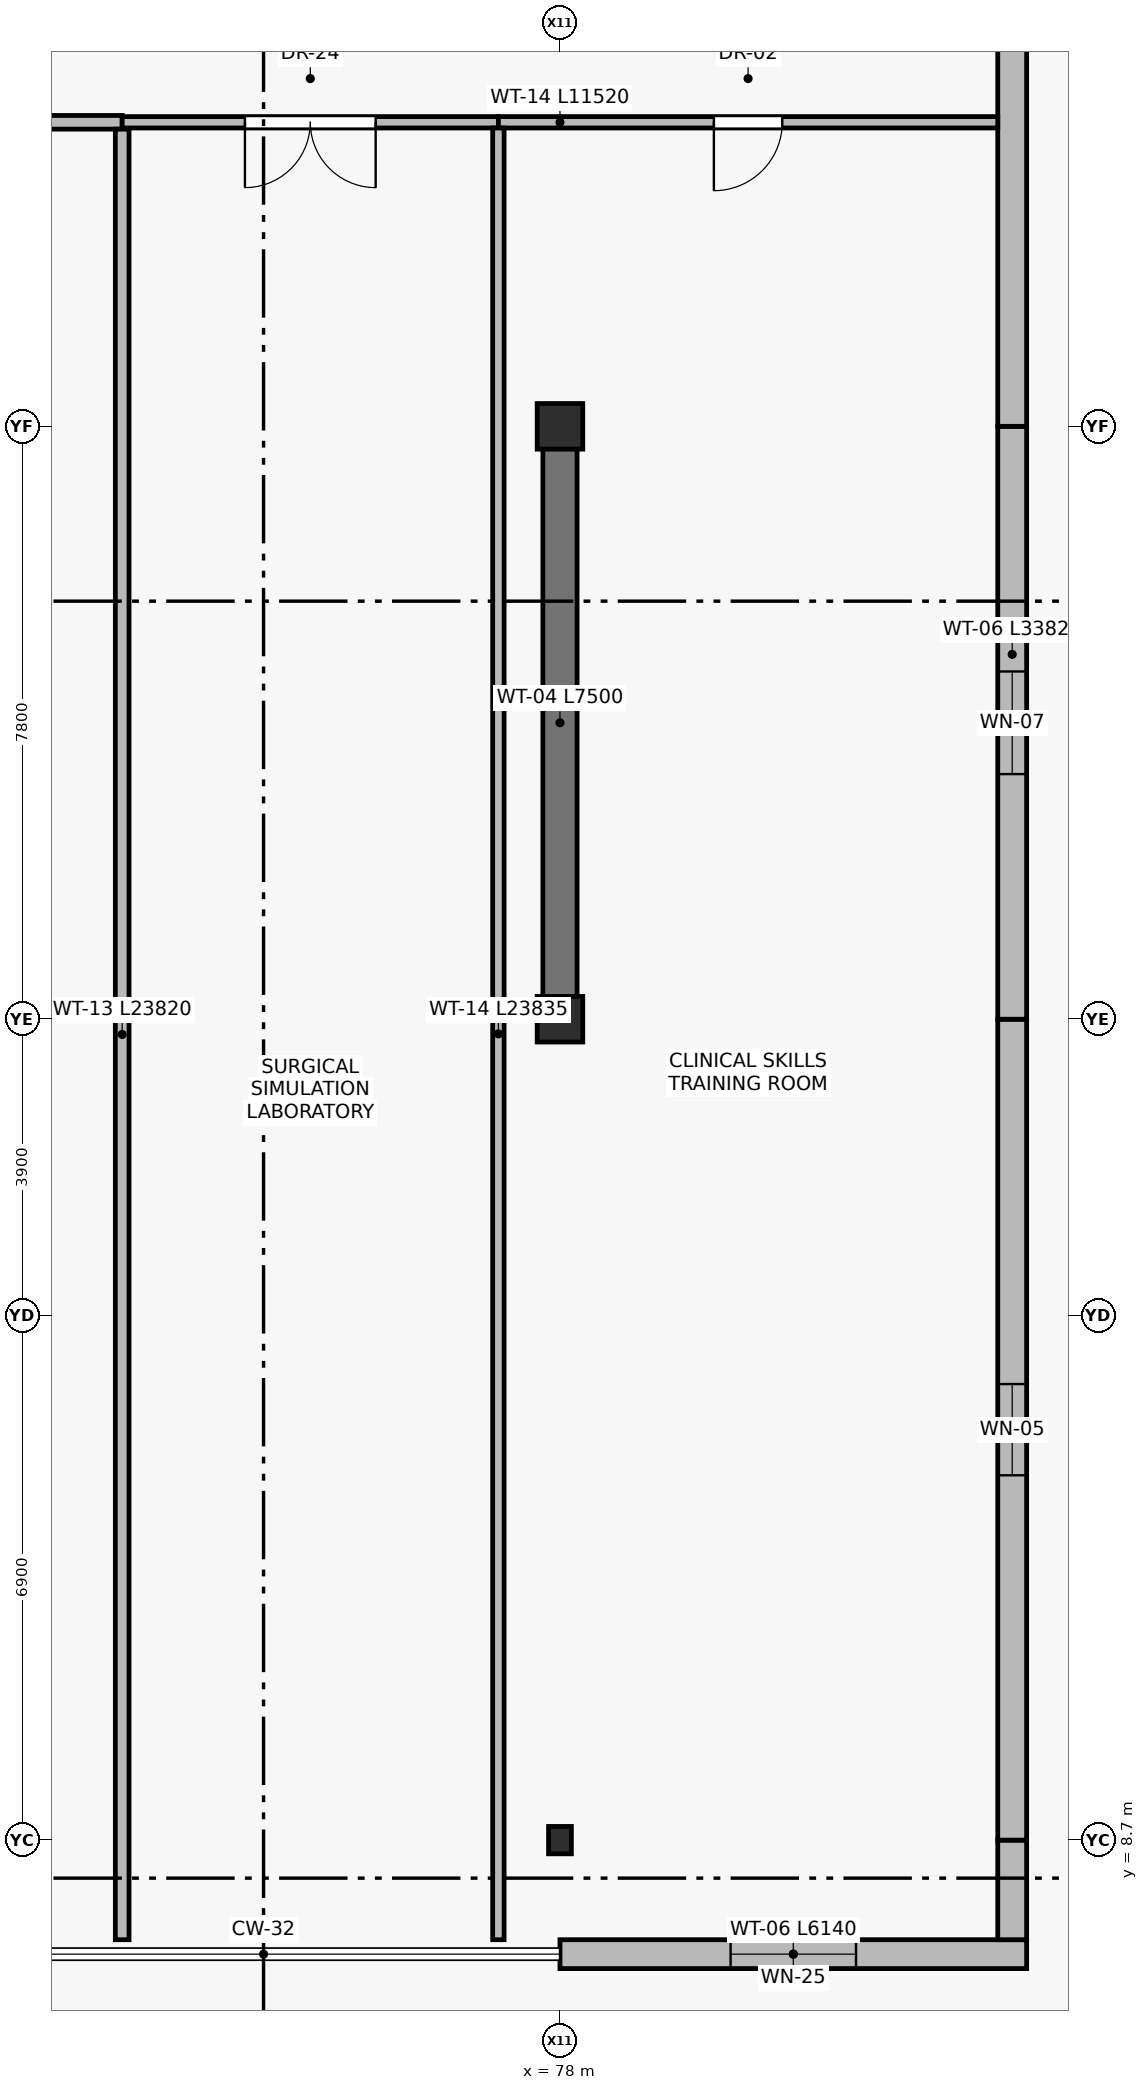
"""IFC4 building model, lengths in metres.
Left out: names, types, materials, properties, quantities, classifications, styles, units other than length and angle.
Written with IfcOpenShell. Run it as: python <this file> out.ifc"""

import sys

from ifc_helpers import new_model, si_unit, direction, frame, frame_2d, origin, origin_2d, place, context, subcontext, project, spatial, rectangle, i_section, extrude, element, fill, save


model = new_model("IFC4")
c1 = context("Model", 3, precision=1e-05, world=origin(), true_north=direction((0.0, 1.0)))
c2 = subcontext(c1, "Body", "Model", "MODEL_VIEW")
j1 = project(units=[si_unit("LENGTHUNIT", "METRE"), si_unit("PLANEANGLEUNIT", "RADIAN")], contexts=[c1])
p1 = place(None, origin())
s1 = spatial("IfcSite", under=j1, at=p1, CompositionType="ELEMENT")
p2 = place(p1, origin())
s2 = spatial("IfcBuilding", under=s1, at=p2, CompositionType="ELEMENT")
p3 = place(p2, frame((0.0, 0.0, 9.6)))
s3 = spatial("IfcBuildingStorey", under=s2, at=p3, CompositionType="ELEMENT", Elevation=9.6)
for number, where, z_axis, x_axis in (
    (1, (78.0, 19.5, 0.0), (0.0, 0.0, 1.0), (1.0, 0.0, 0.0)),
    (2, (78.0, 27.3, 0.0), (0.0, 0.0, 1.0), (1.0, 0.0, 0.0)),
):
    element("IfcColumn", number, at=place(p3, frame(where, z_axis=z_axis, x_axis=x_axis)), inside=s3, PredefinedType="COLUMN", context=c2, shape_type="SweptSolid", body=[
        extrude(rectangle(XDim=0.6, YDim=0.6, at=origin_2d()), origin(), (0.0, 0.0, 1.0), 4.5),
    ])
p4 = place(p3, frame((78.0, 8.7, 0.0), z_axis=(0.0, 0.0, 1.0), x_axis=(1.0, 0.0, 0.0)))
e3 = element("IfcColumn", 3, at=p4, inside=s3, PredefinedType="COLUMN", context=c2, shape_type="SweptSolid", body=[
    extrude(i_section(OverallWidth=0.3, OverallDepth=0.36, WebThickness=0.012, FlangeThickness=0.022, at=origin_2d()), origin(), (0.0, 0.0, 1.0), 4.5),
])
p5 = place(p3, frame((84.14, 7.2, 0.0), z_axis=(0.0, 0.0, 1.0), x_axis=(-1.0, 0.0, 0.0)))
e4 = element("IfcWall", 4, at=p5, inside=s3, PredefinedType="STANDARD", context=c2, shape_type="SweptSolid", body=[
    extrude(rectangle(XDim=6.14, YDim=0.38, at=frame_2d((3.07, 0.0))), origin(), (0.0, 0.0, 1.0), 4.24),
])
p6 = place(p5, frame((2.245, 0.0, 0.9)))
e5 = element("IfcOpeningElement", 5, at=p6, cuts=e4, PredefinedType="OPENING", context=c2, shape_type="SweptSolid", body=[
    extrude(rectangle(XDim=1.65, YDim=2.15, at=frame_2d((0.825, 1.075))), frame((0.0, 0.2, 0.0), z_axis=(0.0, -1.0, 0.0), x_axis=(1.0, 0.0, 0.0)), (0.0, 0.0, 1.0), 0.4),
])
p7 = place(p3, frame((83.95, 8.7, 0.0), z_axis=(0.0, 0.0, 1.0), x_axis=(0.0, -1.0, 0.0)))
e6 = element("IfcWall", 6, at=p7, inside=s3, PredefinedType="STANDARD", context=c2, shape_type="SweptSolid", body=[
    extrude(rectangle(XDim=1.31, YDim=0.38, at=frame_2d((0.655, 0.0))), origin(), (0.0, 0.0, 1.0), 4.24),
])
p8 = place(p3, frame((83.95, 19.5, 0.0), z_axis=(0.0, 0.0, 1.0), x_axis=(0.0, -1.0, 0.0)))
e7 = element("IfcWall", 7, at=p8, inside=s3, PredefinedType="STANDARD", context=c2, shape_type="SweptSolid", body=[
    extrude(rectangle(XDim=10.8, YDim=0.38, at=frame_2d((5.4, 0.0))), origin(), (0.0, 0.0, 1.0), 4.24),
])
p9 = place(p8, frame((4.8, 0.0, 0.9)))
e8 = element("IfcOpeningElement", 8, at=p9, cuts=e7, PredefinedType="OPENING", context=c2, shape_type="SweptSolid", body=[
    extrude(rectangle(XDim=1.2, YDim=1.8, at=frame_2d((0.6, 0.9))), frame((0.0, 0.2, 0.0), z_axis=(0.0, -1.0, 0.0), x_axis=(1.0, 0.0, 0.0)), (0.0, 0.0, 1.0), 0.4),
])
p10 = place(p3, frame((83.95, 27.3, 0.0), z_axis=(0.0, 0.0, 1.0), x_axis=(0.0, -1.0, 0.0)))
e9 = element("IfcWall", 9, at=p10, inside=s3, PredefinedType="STANDARD", context=c2, shape_type="SweptSolid", body=[
    extrude(rectangle(XDim=7.8, YDim=0.38, at=frame_2d((3.9, 0.0))), origin(), (0.0, 0.0, 1.0), 4.24),
])
p11 = place(p10, frame((3.225, 0.0, 0.9)))
e10 = element("IfcOpeningElement", 10, at=p11, cuts=e9, PredefinedType="OPENING", context=c2, shape_type="SweptSolid", body=[
    extrude(rectangle(XDim=1.35, YDim=1.75, at=frame_2d((0.675, 0.875))), frame((0.0, 0.2, 0.0), z_axis=(0.0, -1.0, 0.0), x_axis=(1.0, 0.0, 0.0)), (0.0, 0.0, 1.0), 0.4),
])
p12 = place(p3, frame((83.95, 35.1, 0.0), z_axis=(0.0, 0.0, 1.0), x_axis=(0.0, -1.0, 0.0)))
e11 = element("IfcWall", 11, at=p12, inside=s3, PredefinedType="STANDARD", context=c2, shape_type="SweptSolid", body=[
    extrude(rectangle(XDim=7.8, YDim=0.38, at=frame_2d((3.9, 0.0))), origin(), (0.0, 0.0, 1.0), 4.24),
])
p13 = place(p12, frame((1.525, 0.0, 0.0)))
e12 = element("IfcOpeningElement", 12, at=p13, cuts=e11, PredefinedType="OPENING", context=c2, shape_type="SweptSolid", body=[
    extrude(rectangle(XDim=1.25, YDim=2.2, at=frame_2d((0.625, 1.1))), frame((0.0, 0.2, 0.0), z_axis=(0.0, -1.0, 0.0), x_axis=(1.0, 0.0, 0.0)), (0.0, 0.0, 1.0), 0.4),
])
p14 = place(p3, frame((78.0, 19.65, 0.0), z_axis=(0.0, 0.0, 1.0), x_axis=(0.0, 1.0, 0.0)))
e13 = element("IfcWall", 13, at=p14, inside=s3, PredefinedType="SHEAR", context=c2, shape_type="SweptSolid", body=[
    extrude(rectangle(XDim=7.5, YDim=0.45, at=frame_2d((3.75, 0.0))), origin(), (0.0, 0.0, 1.0), 4.24),
])
p15 = place(p3, frame((72.24, 31.3, 0.0), z_axis=(0.0, 0.0, 1.0), x_axis=(-1.0, 0.0, 0.0)))
e14 = element("IfcWall", 14, at=p15, inside=s3, PredefinedType="PARTITIONING", context=c2, shape_type="SweptSolid", body=[
    extrude(rectangle(XDim=15.6, YDim=0.18, at=frame_2d((7.8, 0.0))), origin(), (0.0, 0.0, 1.0), 4.24),
])
p16 = place(p15, frame((7.0, 0.0, 0.0)))
e15 = element("IfcOpeningElement", 15, at=p16, cuts=e14, PredefinedType="OPENING", context=c2, shape_type="SweptSolid", body=[
    extrude(rectangle(XDim=1.6, YDim=2.2, at=frame_2d((0.8, 1.1))), frame((0.0, 0.1, 0.0), z_axis=(0.0, -1.0, 0.0), x_axis=(1.0, 0.0, 0.0)), (0.0, 0.0, 1.0), 0.2),
])
p17 = place(p3, frame((77.19, 31.3, 0.0), z_axis=(0.0, 0.0, 1.0), x_axis=(-1.0, 0.0, 0.0)))
e16 = element("IfcWall", 16, at=p17, inside=s3, PredefinedType="PARTITIONING", context=c2, shape_type="SweptSolid", body=[
    extrude(rectangle(XDim=4.95, YDim=0.15, at=frame_2d((2.475, 0.0))), origin(), (0.0, 0.0, 1.0), 4.24),
])
p18 = place(p17, frame((1.615, 0.0, 0.0)))
e17 = element("IfcOpeningElement", 17, at=p18, cuts=e16, PredefinedType="OPENING", context=c2, shape_type="SweptSolid", body=[
    extrude(rectangle(XDim=1.72, YDim=2.3, at=frame_2d((0.86, 1.15))), frame((0.0, 0.085, 0.0), z_axis=(0.0, -1.0, 0.0), x_axis=(1.0, 0.0, 0.0)), (0.0, 0.0, 1.0), 0.17),
])
p19 = place(p3, frame((83.76, 31.3, 0.0), z_axis=(0.0, 0.0, 1.0), x_axis=(-1.0, 0.0, 0.0)))
e18 = element("IfcWall", 18, at=p19, inside=s3, PredefinedType="PARTITIONING", context=c2, shape_type="SweptSolid", body=[
    extrude(rectangle(XDim=6.57, YDim=0.15, at=frame_2d((3.285, 0.0))), origin(), (0.0, 0.0, 1.0), 4.24),
])
p20 = place(p19, frame((2.835, 0.0, 0.0)))
e19 = element("IfcOpeningElement", 19, at=p20, cuts=e18, PredefinedType="OPENING", context=c2, shape_type="SweptSolid", body=[
    extrude(rectangle(XDim=0.9, YDim=2.1, at=frame_2d((0.45, 1.05))), frame((0.0, 0.085, 0.0), z_axis=(0.0, -1.0, 0.0), x_axis=(1.0, 0.0, 0.0)), (0.0, 0.0, 1.0), 0.17),
])
p21 = place(p3, frame((72.24, 7.39, 0.0), z_axis=(0.0, 0.0, 1.0), x_axis=(0.0, 1.0, 0.0)))
e20 = element("IfcWall", 20, at=p21, inside=s3, PredefinedType="PARTITIONING", context=c2, shape_type="SweptSolid", body=[
    extrude(rectangle(XDim=23.82, YDim=0.18, at=frame_2d((11.91, 0.0))), origin(), (0.0, 0.0, 1.0), 4.24),
])
p22 = place(p3, frame((77.19, 7.39, 0.0), z_axis=(0.0, 0.0, 1.0), x_axis=(0.0, 1.0, 0.0)))
e21 = element("IfcWall", 21, at=p22, inside=s3, PredefinedType="PARTITIONING", context=c2, shape_type="SweptSolid", body=[
    extrude(rectangle(XDim=23.835, YDim=0.15, at=frame_2d((11.917, 0.0))), origin(), (0.0, 0.0, 1.0), 4.24),
])
p23 = place(p6, origin())
e22 = element("IfcWindow", 22, at=p23, inside=s3, PartitioningType="SINGLE_PANEL", PredefinedType="WINDOW", context=c2, shape_type="SweptSolid", body=[
    extrude(rectangle(XDim=1.65, YDim=2.15, at=frame_2d((0.825, 1.075))), frame((0.0, 0.03, 0.0), z_axis=(0.0, -1.0, 0.0), x_axis=(1.0, 0.0, 0.0)), (0.0, 0.0, 1.0), 0.06),
])
fill(e5, e22)
p24 = place(p9, origin())
e23 = element("IfcWindow", 23, at=p24, inside=s3, PartitioningType="SINGLE_PANEL", PredefinedType="WINDOW", context=c2, shape_type="SweptSolid", body=[
    extrude(rectangle(XDim=1.2, YDim=1.8, at=frame_2d((0.6, 0.9))), frame((0.0, 0.03, 0.0), z_axis=(0.0, -1.0, 0.0), x_axis=(1.0, 0.0, 0.0)), (0.0, 0.0, 1.0), 0.06),
])
fill(e8, e23)
p25 = place(p11, origin())
e24 = element("IfcWindow", 24, at=p25, inside=s3, PartitioningType="SINGLE_PANEL", PredefinedType="WINDOW", context=c2, shape_type="SweptSolid", body=[
    extrude(rectangle(XDim=1.35, YDim=1.75, at=frame_2d((0.675, 0.875))), frame((0.0, 0.03, 0.0), z_axis=(0.0, -1.0, 0.0), x_axis=(1.0, 0.0, 0.0)), (0.0, 0.0, 1.0), 0.06),
])
fill(e10, e24)
p26 = place(p18, origin())
e25 = element("IfcDoor", 25, at=p26, inside=s3, OperationType="DOUBLE_DOOR_SINGLE_SWING", PredefinedType="DOOR", context=c2, shape_type="SweptSolid", body=[
    extrude(rectangle(XDim=1.72, YDim=2.3, at=frame_2d((0.86, 1.15))), frame((0.0, 0.025, 0.0), z_axis=(0.0, -1.0, 0.0), x_axis=(1.0, 0.0, 0.0)), (0.0, 0.0, 1.0), 0.05),
])
fill(e17, e25)
p27 = place(p20, origin())
e26 = element("IfcDoor", 26, at=p27, inside=s3, OperationType="SINGLE_SWING_RIGHT", PredefinedType="DOOR", context=c2, shape_type="SweptSolid", body=[
    extrude(rectangle(XDim=0.9, YDim=2.1, at=frame_2d((0.45, 1.05))), frame((0.0, 0.025, 0.0), z_axis=(0.0, -1.0, 0.0), x_axis=(1.0, 0.0, 0.0)), (0.0, 0.0, 1.0), 0.05),
])
fill(e19, e26)
save(model, sys.argv[1])
